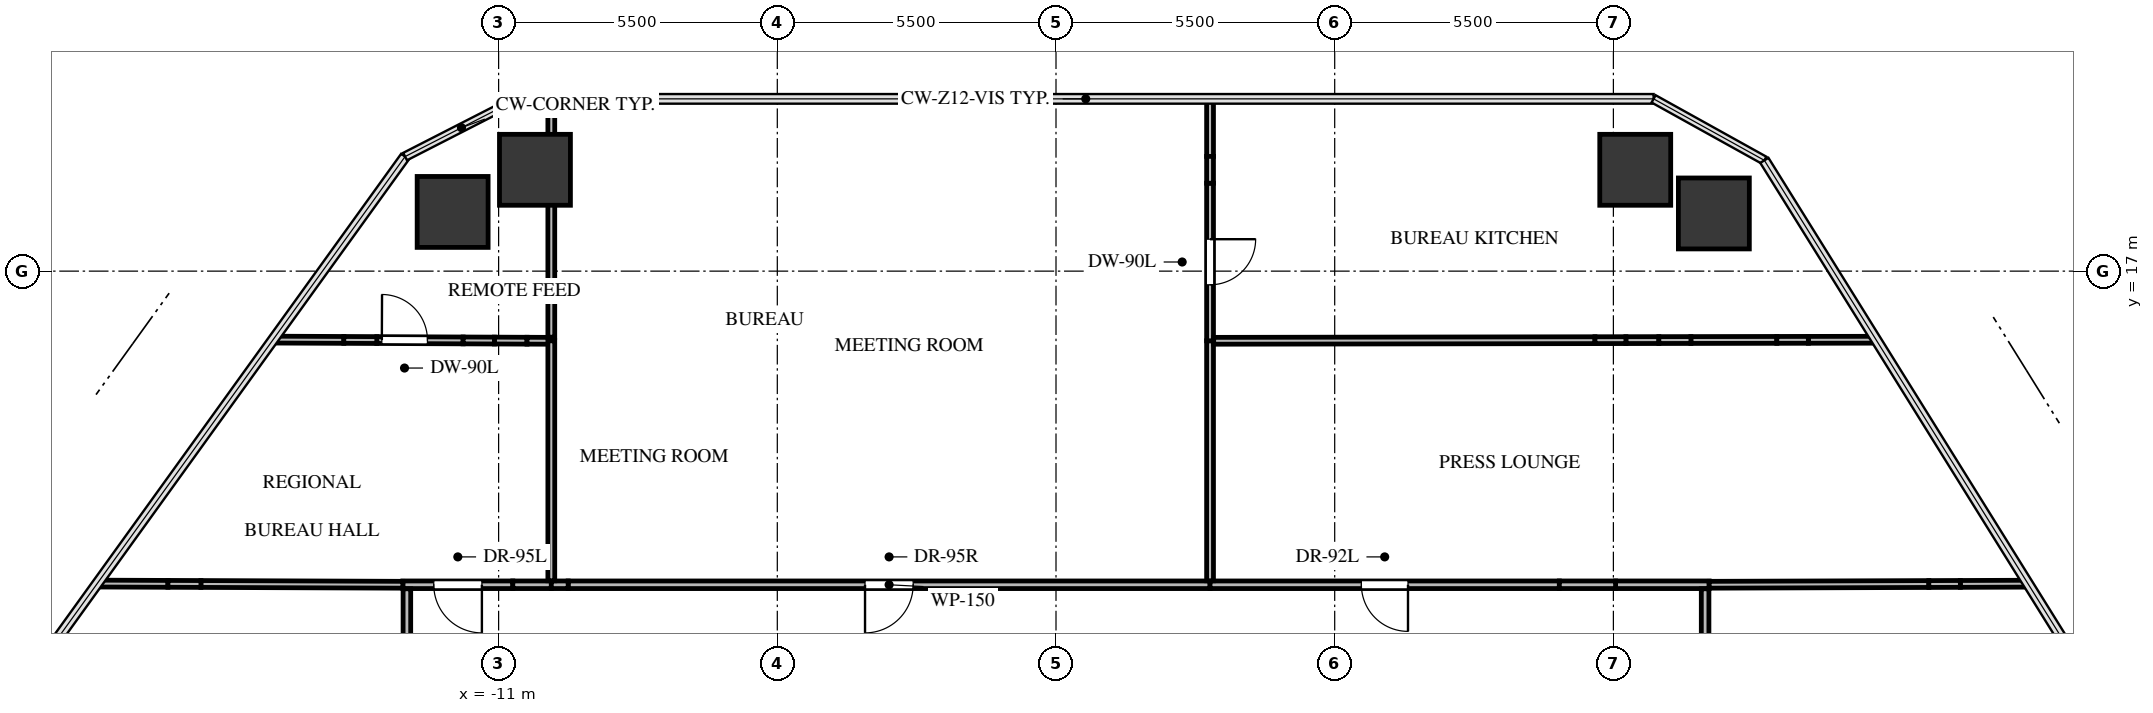
"""IFC4 building model, lengths in metres.
Left out: names, types, materials, properties, quantities, classifications, styles, units other than length and angle.
Written with IfcOpenShell. Run it as: python <this file> out.ifc"""

import sys

from ifc_helpers import new_model, si_unit, direction, frame, frame_2d, origin, origin_2d, place, context, subcontext, project, spatial, rectangle, extrude, source, transform, mapped, element, fill, save


model = new_model("IFC4")
c1 = context("Model", 3, precision=1e-05, world=origin(), true_north=direction((0.0, 1.0)))
c2 = subcontext(c1, "Body", "Model", "MODEL_VIEW")
j1 = project(units=[si_unit("LENGTHUNIT", "METRE"), si_unit("PLANEANGLEUNIT", "RADIAN")], contexts=[c1])
p1 = place(None, origin())
s1 = spatial("IfcSite", under=j1, at=p1, CompositionType="ELEMENT")
p2 = place(p1, origin())
s2 = spatial("IfcBuilding", under=s1, at=p2, CompositionType="ELEMENT")
p3 = place(p2, frame((0.0, 0.0, 81.3)))
s3 = spatial("IfcBuildingStorey", under=s2, at=p3, CompositionType="ELEMENT", Elevation=81.3)
m1 = source(origin(), c2, "Body", "SweptSolid", [
    extrude(rectangle(XDim=1.4, YDim=1.4, at=origin_2d()), origin(), (0.0, 0.0, 1.0), 3.0),
])
for number, where, z_axis, x_axis in (
    (1, (-11.907, 18.168, -0.24), (0.0, 0.0, 1.0), (1.0, 0.0, 0.0)),
    (2, (-10.283, 19.0, -0.24), (0.0, 0.0, 1.0), (1.0, 0.0, 0.0)),
    (3, (11.431, 19.0, -0.24), (0.0, 0.0, 1.0), (1.0, 0.0, 0.0)),
    (4, (12.983, 18.138, -0.24), (0.0, 0.0, 1.0), (1.0, 0.0, 0.0)),
):
    element("IfcColumn", number, at=place(p3, frame(where, z_axis=z_axis, x_axis=x_axis)), inside=s3, PredefinedType="COLUMN", context=c2, shape_type="MappedRepresentation", body=[
        mapped(m1, transform((0.0, 0.0, 0.0), x_axis=(1.0, 0.0, 0.0), y_axis=(0.0, 1.0, 0.0), z_axis=(0.0, 0.0, 1.0), scale=1.0)),
    ])
p4 = place(p3, frame((-10.72, 10.81, 0.0), z_axis=(0.0, 0.0, 1.0), x_axis=(-1.0, 0.0, 0.0)))
e5 = element("IfcWall", 5, at=p4, inside=s3, PredefinedType="PARTITIONING", context=c2, shape_type="SweptSolid", body=[
    extrude(rectangle(XDim=2.17, YDim=0.15, at=frame_2d((1.085, 0.0))), origin(), (0.0, 0.0, 1.0), 2.745),
])
p5 = place(p4, frame((0.61, 0.0, 0.0)))
e6 = element("IfcOpeningElement", 6, at=p5, cuts=e5, PredefinedType="OPENING", context=c2, shape_type="SweptSolid", body=[
    extrude(rectangle(XDim=0.95, YDim=2.1, at=frame_2d((0.475, 1.05))), frame((0.0, 0.085, 0.0), z_axis=(0.0, -1.0, 0.0), x_axis=(1.0, 0.0, 0.0)), (0.0, 0.0, 1.0), 0.17),
])
p6 = place(p3, frame((-9.96, 10.81, 0.0), z_axis=(0.0, 0.0, 1.0), x_axis=(-1.0, 0.0, 0.0)))
e7 = element("IfcWall", 7, at=p6, inside=s3, PredefinedType="PARTITIONING", context=c2, shape_type="SweptSolid", body=[
    extrude(rectangle(XDim=0.76, YDim=0.15, at=frame_2d((0.38, 0.0))), origin(), (0.0, 0.0, 1.0), 1.83),
])
p7 = place(p3, frame((3.04, 10.81, 0.0), z_axis=(0.0, 0.0, 1.0), x_axis=(-1.0, 0.0, 0.0)))
e8 = element("IfcWall", 8, at=p7, inside=s3, PredefinedType="PARTITIONING", context=c2, shape_type="SweptSolid", body=[
    extrude(rectangle(XDim=12.667, YDim=0.15, at=frame_2d((6.334, 0.0))), origin(), (0.0, 0.0, 1.0), 2.298),
])
p8 = place(p7, frame((5.859, 0.0, 0.0)))
e9 = element("IfcOpeningElement", 9, at=p8, cuts=e8, PredefinedType="OPENING", context=c2, shape_type="SweptSolid", body=[
    extrude(rectangle(XDim=0.95, YDim=2.1, at=frame_2d((0.475, 1.05))), frame((0.0, 0.085, 0.0), z_axis=(0.0, -1.0, 0.0), x_axis=(1.0, 0.0, 0.0)), (0.0, 0.0, 1.0), 0.17),
])
p9 = place(p3, frame((-9.627, 10.81, 0.0), z_axis=(0.0, 0.0, 1.0), x_axis=(-1.0, 0.0, 0.0)))
e10 = element("IfcWall", 10, at=p9, inside=s3, PredefinedType="PARTITIONING", context=c2, shape_type="SweptSolid", body=[
    extrude(rectangle(XDim=0.333, YDim=0.15, at=frame_2d((0.166, 0.0))), origin(), (0.0, 0.0, 1.0), 1.83),
])
p10 = place(p3, frame((12.89, 10.81, 0.0), z_axis=(0.0, 0.0, 1.0), x_axis=(-1.0, 0.0, 0.0)))
e11 = element("IfcWall", 11, at=p10, inside=s3, PredefinedType="PARTITIONING", context=c2, shape_type="SweptSolid", body=[
    extrude(rectangle(XDim=1.847, YDim=0.15, at=frame_2d((0.924, 0.0))), origin(), (0.0, 0.0, 1.0), 2.745),
])
p11 = place(p3, frame((9.933, 10.81, 0.0), z_axis=(0.0, 0.0, 1.0), x_axis=(-1.0, 0.0, 0.0)))
e12 = element("IfcWall", 12, at=p11, inside=s3, PredefinedType="PARTITIONING", context=c2, shape_type="SweptSolid", body=[
    extrude(rectangle(XDim=6.893, YDim=0.15, at=frame_2d((3.447, 0.0))), origin(), (0.0, 0.0, 1.0), 2.298),
])
p12 = place(p11, frame((2.987, 0.0, 0.0)))
e13 = element("IfcOpeningElement", 13, at=p12, cuts=e12, PredefinedType="OPENING", context=c2, shape_type="SweptSolid", body=[
    extrude(rectangle(XDim=0.92, YDim=2.1, at=frame_2d((0.46, 1.05))), frame((0.0, 0.085, 0.0), z_axis=(0.0, -1.0, 0.0), x_axis=(1.0, 0.0, 0.0)), (0.0, 0.0, 1.0), 0.17),
])
p13 = place(p3, frame((11.042, 10.81, 0.0), z_axis=(0.0, 0.0, 1.0), x_axis=(-1.0, 0.0, 0.0)))
e14 = element("IfcWall", 14, at=p13, inside=s3, PredefinedType="PARTITIONING", context=c2, shape_type="SweptSolid", body=[
    extrude(rectangle(XDim=1.109, YDim=0.15, at=frame_2d((0.555, 0.0))), origin(), (0.0, 0.0, 1.0), 1.83),
])
p14 = place(p3, frame((-12.81, 10.731, 0.0), z_axis=(0.0, 0.0, 1.0), x_axis=(0.0, -1.0, 0.0)))
e15 = element("IfcWall", 15, at=p14, inside=s3, PredefinedType="PARTITIONING", context=c2, shape_type="SweptSolid", body=[
    extrude(rectangle(XDim=8.139, YDim=0.15, at=frame_2d((4.069, 0.0))), origin(), (0.0, 0.0, 1.0), 2.745),
])
p15 = place(p3, frame((12.81, 2.49, 0.0), z_axis=(0.0, 0.0, 1.0), x_axis=(0.0, 1.0, 0.0)))
e16 = element("IfcWall", 16, at=p15, inside=s3, PredefinedType="PARTITIONING", context=c2, shape_type="SweptSolid", body=[
    extrude(rectangle(XDim=8.241, YDim=0.15, at=frame_2d((4.121, 0.0))), origin(), (0.0, 0.0, 1.0), 2.745),
])
p16 = place(p15, frame((3.66, 0.0, 0.0)))
e17 = element("IfcOpeningElement", 17, at=p16, cuts=e16, PredefinedType="OPENING", context=c2, shape_type="SweptSolid", body=[
    extrude(rectangle(XDim=0.92, YDim=2.1, at=frame_2d((0.46, 1.05))), frame((0.0, 0.085, 0.0), z_axis=(0.0, -1.0, 0.0), x_axis=(1.0, 0.0, 0.0)), (0.0, 0.0, 1.0), 0.17),
])
p17 = place(p3, frame((-15.45, 15.648, 0.0), z_axis=(0.0, 0.0, 1.0), x_axis=(0.999991185406, -0.004198703368, 0.0)))
e18 = element("IfcWall", 18, at=p17, inside=s3, PredefinedType="PARTITIONING", context=c2, shape_type="SweptSolid", body=[
    extrude(rectangle(XDim=1.396, YDim=0.135, at=frame_2d((0.698, 0.0))), origin(), (0.0, 0.0, 1.0), 2.745),
])
p18 = place(p3, frame((-13.405, 15.64, 0.0), z_axis=(0.0, 0.0, 1.0), x_axis=(0.999990766396, -0.004297338919, 0.0)))
e19 = element("IfcWall", 19, at=p18, inside=s3, PredefinedType="PARTITIONING", context=c2, shape_type="SweptSolid", body=[
    extrude(rectangle(XDim=1.704, YDim=0.135, at=frame_2d((0.852, 0.0))), origin(), (0.0, 0.0, 1.0), 2.745),
])
p19 = place(p18, frame((0.1, 0.0, 0.0)))
e20 = element("IfcOpeningElement", 20, at=p19, cuts=e19, PredefinedType="OPENING", context=c2, shape_type="SweptSolid", body=[
    extrude(rectangle(XDim=0.9, YDim=2.05, at=frame_2d((0.45, 1.025))), frame((0.0, 0.078, 0.0), z_axis=(0.0, -1.0, 0.0), x_axis=(1.0, 0.0, 0.0)), (0.0, 0.0, 1.0), 0.155),
])
p20 = place(p3, frame((-11.083, 15.63, 0.0), z_axis=(0.0, 0.0, 1.0), x_axis=(0.999989638206, -0.004552304878, 0.0)))
e21 = element("IfcWall", 21, at=p20, inside=s3, PredefinedType="PARTITIONING", context=c2, shape_type="SweptSolid", body=[
    extrude(rectangle(XDim=0.644, YDim=0.135, at=frame_2d((0.322, 0.0))), origin(), (0.0, 0.0, 1.0), 2.745),
])
p21 = place(p3, frame((-14.055, 15.643, 0.0), z_axis=(0.0, 0.0, 1.0), x_axis=(0.999989847253, -0.004506150269, 0.0)))
e22 = element("IfcWall", 22, at=p21, inside=s3, PredefinedType="PARTITIONING", context=c2, shape_type="SweptSolid", body=[
    extrude(rectangle(XDim=0.65, YDim=0.135, at=frame_2d((0.325, 0.0))), origin(), (0.0, 0.0, 1.0), 2.08),
])
p22 = place(p3, frame((-11.7, 15.632, 0.0), z_axis=(0.0, 0.0, 1.0), x_axis=(0.999992170132, -0.00395723059, 0.0)))
e23 = element("IfcWall", 23, at=p22, inside=s3, PredefinedType="PARTITIONING", context=c2, shape_type="SweptSolid", body=[
    extrude(rectangle(XDim=0.617, YDim=0.135, at=frame_2d((0.309, 0.0))), origin(), (0.0, 0.0, 1.0), 1.83),
])
p23 = place(p3, frame((-10.44, 15.627, 0.0), z_axis=(0.0, 0.0, 1.0), x_axis=(0.999991712578, -0.004071213079, 0.0)))
e24 = element("IfcWall", 24, at=p23, inside=s3, PredefinedType="PARTITIONING", context=c2, shape_type="SweptSolid", body=[
    extrude(rectangle(XDim=0.48, YDim=0.135, at=frame_2d((0.24, 0.0))), origin(), (0.0, 0.0, 1.0), 1.83),
])
p24 = place(p3, frame((-9.96, 15.625, 0.0), z_axis=(0.0, 0.0, 1.0), x_axis=(0.0, -1.0, 0.0)))
e25 = element("IfcWall", 25, at=p24, inside=s3, PredefinedType="PARTITIONING", context=c2, shape_type="SweptSolid", body=[
    extrude(rectangle(XDim=4.736, YDim=0.135, at=frame_2d((2.368, 0.0))), origin(), (0.0, 0.0, 1.0), 1.83),
])
p25 = place(p3, frame((-12.89, 10.81, 0.0), z_axis=(0.0, 0.0, 1.0), x_axis=(-0.999992552799, 0.003859319458, 0.0)))
e26 = element("IfcWall", 26, at=p25, inside=s3, PredefinedType="PARTITIONING", context=c2, shape_type="SweptSolid", body=[
    extrude(rectangle(XDim=3.985, YDim=0.135, at=frame_2d((1.993, 0.0))), origin(), (0.0, 0.0, 1.0), 2.745),
])
p26 = place(p3, frame((-17.526, 10.828, 0.0), z_axis=(0.0, 0.0, 1.0), x_axis=(-0.999992598457, 0.003847470648, 0.0)))
e27 = element("IfcWall", 27, at=p26, inside=s3, PredefinedType="PARTITIONING", context=c2, shape_type="SweptSolid", body=[
    extrude(rectangle(XDim=1.396, YDim=0.135, at=frame_2d((0.698, 0.0))), origin(), (0.0, 0.0, 1.0), 2.745),
])
p27 = place(p3, frame((-16.875, 10.826, 0.0), z_axis=(0.0, 0.0, 1.0), x_axis=(-0.999992960027, 0.003752318799, 0.0)))
e28 = element("IfcWall", 28, at=p27, inside=s3, PredefinedType="PARTITIONING", context=c2, shape_type="SweptSolid", body=[
    extrude(rectangle(XDim=0.651, YDim=0.135, at=frame_2d((0.325, 0.0))), origin(), (0.0, 0.0, 1.0), 2.08),
])
p28 = place(p3, frame((-9.96, 20.4, 0.0), z_axis=(0.0, 0.0, 1.0), x_axis=(0.0, -1.0, 0.0)))
e29 = element("IfcWall", 29, at=p28, inside=s3, PredefinedType="PARTITIONING", context=c2, shape_type="SweptSolid", body=[
    extrude(rectangle(XDim=1.135, YDim=0.135, at=frame_2d((0.568, 0.0))), origin(), (0.0, 0.0, 1.0), 2.745),
])
p29 = place(p3, frame((-9.96, 18.736, 0.0), z_axis=(0.0, 0.0, 1.0), x_axis=(0.0, -1.0, 0.0)))
e30 = element("IfcWall", 30, at=p29, inside=s3, PredefinedType="PARTITIONING", context=c2, shape_type="SweptSolid", body=[
    extrude(rectangle(XDim=0.212, YDim=0.135, at=frame_2d((0.106, 0.0))), origin(), (0.0, 0.0, 1.0), 1.83),
])
p30 = place(p3, frame((-9.96, 19.264, 0.0), z_axis=(0.0, 0.0, 1.0), x_axis=(0.0, -1.0, 0.0)))
e31 = element("IfcWall", 31, at=p30, inside=s3, PredefinedType="PARTITIONING", context=c2, shape_type="SweptSolid", body=[
    extrude(rectangle(XDim=0.529, YDim=0.135, at=frame_2d((0.264, 0.0))), origin(), (0.0, 0.0, 1.0), 1.83),
])
p31 = place(p3, frame((-9.96, 18.524, 0.0), z_axis=(0.0, 0.0, 1.0), x_axis=(0.0, -1.0, 0.0)))
e32 = element("IfcWall", 32, at=p31, inside=s3, PredefinedType="PARTITIONING", context=c2, shape_type="SweptSolid", body=[
    extrude(rectangle(XDim=2.827, YDim=0.135, at=frame_2d((1.414, 0.0))), origin(), (0.0, 0.0, 1.0), 1.83),
])
p32 = place(p3, frame((3.04, 15.625, 0.0), z_axis=(0.0, 0.0, 1.0), x_axis=(0.0, -1.0, 0.0)))
e33 = element("IfcWall", 33, at=p32, inside=s3, PredefinedType="PARTITIONING", context=c2, shape_type="SweptSolid", body=[
    extrude(rectangle(XDim=4.736, YDim=0.135, at=frame_2d((2.368, 0.0))), origin(), (0.0, 0.0, 1.0), 2.745),
])
p33 = place(p3, frame((3.04, 20.4, 0.0), z_axis=(0.0, 0.0, 1.0), x_axis=(0.0, -1.0, 0.0)))
e34 = element("IfcWall", 34, at=p33, inside=s3, PredefinedType="PARTITIONING", context=c2, shape_type="SweptSolid", body=[
    extrude(rectangle(XDim=1.135, YDim=0.135, at=frame_2d((0.568, 0.0))), origin(), (0.0, 0.0, 1.0), 2.745),
])
p34 = place(p3, frame((3.04, 18.736, 0.0), z_axis=(0.0, 0.0, 1.0), x_axis=(0.0, -1.0, 0.0)))
e35 = element("IfcWall", 35, at=p34, inside=s3, PredefinedType="PARTITIONING", context=c2, shape_type="SweptSolid", body=[
    extrude(rectangle(XDim=3.111, YDim=0.135, at=frame_2d((1.555, 0.0))), origin(), (0.0, 0.0, 1.0), 2.745),
])
p35 = place(p34, frame((1.105, 0.0, 0.0)))
e36 = element("IfcOpeningElement", 36, at=p35, cuts=e35, PredefinedType="OPENING", context=c2, shape_type="SweptSolid", body=[
    extrude(rectangle(XDim=0.9, YDim=2.05, at=frame_2d((0.45, 1.025))), frame((0.0, 0.078, 0.0), z_axis=(0.0, -1.0, 0.0), x_axis=(1.0, 0.0, 0.0)), (0.0, 0.0, 1.0), 0.155),
])
p36 = place(p3, frame((3.04, 19.264, 0.0), z_axis=(0.0, 0.0, 1.0), x_axis=(0.0, -1.0, 0.0)))
e37 = element("IfcWall", 37, at=p36, inside=s3, PredefinedType="PARTITIONING", context=c2, shape_type="SweptSolid", body=[
    extrude(rectangle(XDim=0.529, YDim=0.135, at=frame_2d((0.264, 0.0))), origin(), (0.0, 0.0, 1.0), 2.08),
])
p37 = place(p3, frame((3.112, 15.625, 0.0), z_axis=(0.0, 0.0, 1.0), x_axis=(0.99999873623, 0.00158982311, 0.0)))
e38 = element("IfcWall", 38, at=p37, inside=s3, PredefinedType="PARTITIONING", context=c2, shape_type="SweptSolid", body=[
    extrude(rectangle(XDim=7.525, YDim=0.135, at=frame_2d((3.762, 0.0))), origin(), (0.0, 0.0, 1.0), 2.298),
])
p38 = place(p3, frame((11.247, 15.638, 0.0), z_axis=(0.0, 0.0, 1.0), x_axis=(0.999998238671, 0.001876873571, 0.0)))
e39 = element("IfcWall", 39, at=p38, inside=s3, PredefinedType="PARTITIONING", context=c2, shape_type="SweptSolid", body=[
    extrude(rectangle(XDim=0.65, YDim=0.135, at=frame_2d((0.325, 0.0))), origin(), (0.0, 0.0, 1.0), 2.745),
])
p39 = place(p3, frame((12.53, 15.64, 0.0), z_axis=(0.0, 0.0, 1.0), x_axis=(0.999998745314, 0.001584099395, 0.0)))
e40 = element("IfcWall", 40, at=p39, inside=s3, PredefinedType="PARTITIONING", context=c2, shape_type="SweptSolid", body=[
    extrude(rectangle(XDim=1.695, YDim=0.135, at=frame_2d((0.848, 0.0))), origin(), (0.0, 0.0, 1.0), 2.745),
])
p40 = place(p3, frame((14.848, 15.644, 0.0), z_axis=(0.0, 0.0, 1.0), x_axis=(0.999998931687, 0.001461719615, 0.0)))
e41 = element("IfcWall", 41, at=p40, inside=s3, PredefinedType="PARTITIONING", context=c2, shape_type="SweptSolid", body=[
    extrude(rectangle(XDim=1.336, YDim=0.135, at=frame_2d((0.668, 0.0))), origin(), (0.0, 0.0, 1.0), 2.745),
])
p41 = place(p3, frame((10.636, 15.637, 0.0), z_axis=(0.0, 0.0, 1.0), x_axis=(0.999998721026, 0.00159935821, 0.0)))
e42 = element("IfcWall", 42, at=p41, inside=s3, PredefinedType="PARTITIONING", context=c2, shape_type="SweptSolid", body=[
    extrude(rectangle(XDim=0.611, YDim=0.135, at=frame_2d((0.305, 0.0))), origin(), (0.0, 0.0, 1.0), 1.83),
])
p42 = place(p3, frame((11.897, 15.639, 0.0), z_axis=(0.0, 0.0, 1.0), x_axis=(0.999998807414, 0.001544399703, 0.0)))
e43 = element("IfcWall", 43, at=p42, inside=s3, PredefinedType="PARTITIONING", context=c2, shape_type="SweptSolid", body=[
    extrude(rectangle(XDim=0.632, YDim=0.135, at=frame_2d((0.316, 0.0))), origin(), (0.0, 0.0, 1.0), 1.83),
])
p43 = place(p3, frame((14.225, 15.643, 0.0), z_axis=(0.0, 0.0, 1.0), x_axis=(0.999998770671, 0.001568010616, 0.0)))
e44 = element("IfcWall", 44, at=p43, inside=s3, PredefinedType="PARTITIONING", context=c2, shape_type="SweptSolid", body=[
    extrude(rectangle(XDim=0.623, YDim=0.135, at=frame_2d((0.312, 0.0))), origin(), (0.0, 0.0, 1.0), 2.08),
])
p44 = place(p3, frame((19.182, 10.831, 0.0), z_axis=(0.0, 0.0, 1.0), x_axis=(-0.999994579825, -0.00329246432, 0.0)))
e45 = element("IfcWall", 45, at=p44, inside=s3, PredefinedType="PARTITIONING", context=c2, shape_type="SweptSolid", body=[
    extrude(rectangle(XDim=1.335, YDim=0.135, at=frame_2d((0.667, 0.0))), origin(), (0.0, 0.0, 1.0), 2.745),
])
p45 = place(p3, frame((17.225, 10.825, 0.0), z_axis=(0.0, 0.0, 1.0), x_axis=(-0.999994480721, -0.003322427884, 0.0)))
e46 = element("IfcWall", 46, at=p45, inside=s3, PredefinedType="PARTITIONING", context=c2, shape_type="SweptSolid", body=[
    extrude(rectangle(XDim=4.335, YDim=0.135, at=frame_2d((2.168, 0.0))), origin(), (0.0, 0.0, 1.0), 2.745),
])
p46 = place(p3, frame((17.847, 10.827, 0.0), z_axis=(0.0, 0.0, 1.0), x_axis=(-0.999993761903, -0.00353216007, 0.0)))
e47 = element("IfcWall", 47, at=p46, inside=s3, PredefinedType="PARTITIONING", context=c2, shape_type="SweptSolid", body=[
    extrude(rectangle(XDim=0.622, YDim=0.135, at=frame_2d((0.311, 0.0))), origin(), (0.0, 0.0, 1.0), 2.08),
])
m2 = source(origin(), c2, "Body", "SweptSolid", [
    extrude(rectangle(XDim=0.95, YDim=2.1, at=frame_2d((0.475, 1.05))), frame((0.0, 0.025, 0.0), z_axis=(0.0, -1.0, 0.0), x_axis=(1.0, 0.0, 0.0)), (0.0, 0.0, 1.0), 0.05),
])
p47 = place(p5, origin())
e48 = element("IfcDoor", 48, at=p47, inside=s3, OperationType="SINGLE_SWING_LEFT", PredefinedType="DOOR", context=c2, shape_type="MappedRepresentation", body=[
    mapped(m2, transform((0.0, 0.0, 0.0), x_axis=(1.0, 0.0, 0.0), y_axis=(0.0, 1.0, 0.0), z_axis=(0.0, 0.0, 1.0), scale=1.0)),
])
fill(e6, e48)
m3 = source(origin(), c2, "Body", "SweptSolid", [
    extrude(rectangle(XDim=0.95, YDim=2.1, at=frame_2d((0.475, 1.05))), frame((0.0, 0.025, 0.0), z_axis=(0.0, -1.0, 0.0), x_axis=(1.0, 0.0, 0.0)), (0.0, 0.0, 1.0), 0.05),
])
p48 = place(p8, origin())
e49 = element("IfcDoor", 49, at=p48, inside=s3, OperationType="SINGLE_SWING_RIGHT", PredefinedType="DOOR", context=c2, shape_type="MappedRepresentation", body=[
    mapped(m3, transform((0.0, 0.0, 0.0), x_axis=(1.0, 0.0, 0.0), y_axis=(0.0, 1.0, 0.0), z_axis=(0.0, 0.0, 1.0), scale=1.0)),
])
fill(e9, e49)
m4 = source(origin(), c2, "Body", "SweptSolid", [
    extrude(rectangle(XDim=0.92, YDim=2.1, at=frame_2d((0.46, 1.05))), frame((0.0, 0.025, 0.0), z_axis=(0.0, -1.0, 0.0), x_axis=(1.0, 0.0, 0.0)), (0.0, 0.0, 1.0), 0.05),
])
p49 = place(p12, origin())
e50 = element("IfcDoor", 50, at=p49, inside=s3, OperationType="SINGLE_SWING_LEFT", PredefinedType="DOOR", context=c2, shape_type="MappedRepresentation", body=[
    mapped(m4, transform((0.0, 0.0, 0.0), x_axis=(1.0, 0.0, 0.0), y_axis=(0.0, 1.0, 0.0), z_axis=(0.0, 0.0, 1.0), scale=1.0)),
])
fill(e13, e50)
m5 = source(origin(), c2, "Body", "SweptSolid", [
    extrude(rectangle(XDim=0.9, YDim=2.05, at=frame_2d((0.45, 1.025))), frame((0.0, 0.025, 0.0), z_axis=(0.0, -1.0, 0.0), x_axis=(1.0, 0.0, 0.0)), (0.0, 0.0, 1.0), 0.05),
])
p50 = place(p19, origin())
e51 = element("IfcDoor", 51, at=p50, inside=s3, OperationType="SINGLE_SWING_LEFT", PredefinedType="DOOR", context=c2, shape_type="MappedRepresentation", body=[
    mapped(m5, transform((0.0, 0.0, 0.0), x_axis=(1.0, 0.0, 0.0), y_axis=(0.0, 1.0, 0.0), z_axis=(0.0, 0.0, 1.0), scale=1.0)),
])
fill(e20, e51)
p51 = place(p35, origin())
e52 = element("IfcDoor", 52, at=p51, inside=s3, OperationType="SINGLE_SWING_LEFT", PredefinedType="DOOR", context=c2, shape_type="MappedRepresentation", body=[
    mapped(m5, transform((0.0, 0.0, 0.0), x_axis=(1.0, 0.0, 0.0), y_axis=(0.0, 1.0, 0.0), z_axis=(0.0, 0.0, 1.0), scale=1.0)),
])
fill(e36, e52)
save(model, sys.argv[1])
